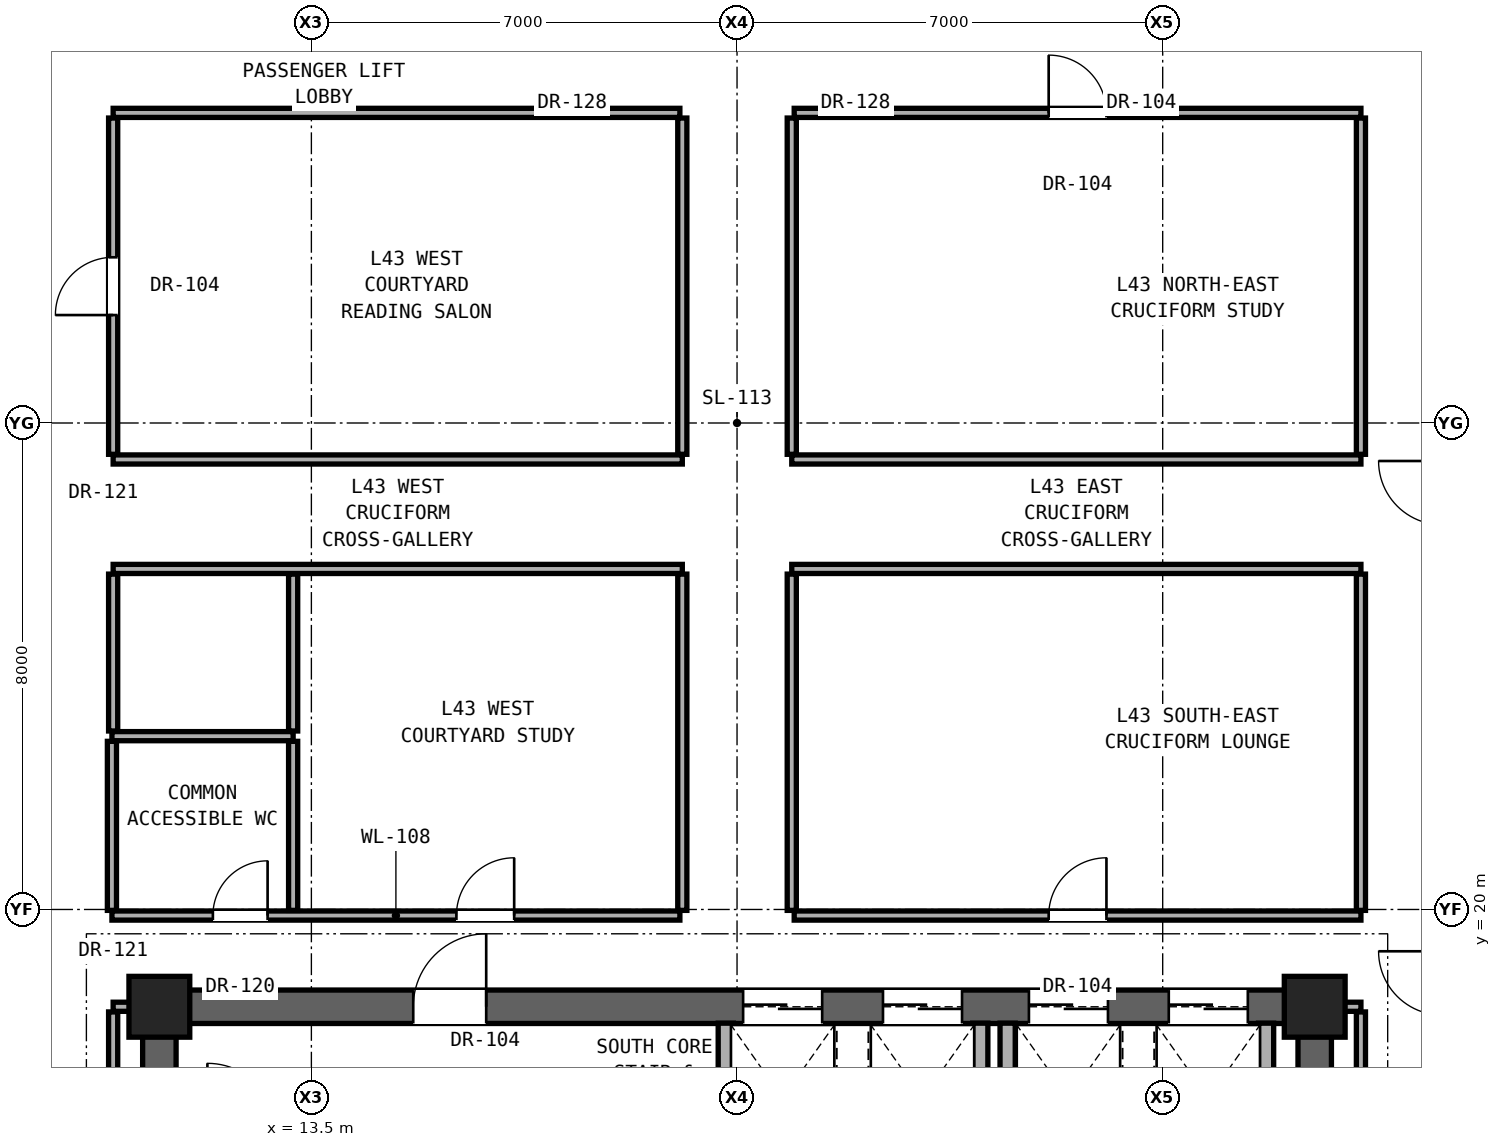
"""IFC4 building model, lengths in metres.
Left out: names, types, materials, properties, quantities, classifications, styles, units other than length and angle.
Written with IfcOpenShell. Run it as: python <this file> out.ifc"""

import sys

from ifc_helpers import new_model, si_unit, direction, frame, frame_2d, origin, origin_2d, place, context, subcontext, project, spatial, rectangle, extrude, element, fill, save


model = new_model("IFC4")
c1 = context("Model", 3, precision=1e-05, world=origin(), true_north=direction((0.0, 1.0)))
c2 = subcontext(c1, "Body", "Model", "MODEL_VIEW")
j1 = project(units=[si_unit("LENGTHUNIT", "METRE"), si_unit("PLANEANGLEUNIT", "RADIAN")], contexts=[c1])
p1 = place(None, origin())
s1 = spatial("IfcSite", under=j1, at=p1, CompositionType="ELEMENT")
p2 = place(p1, origin())
s2 = spatial("IfcBuilding", under=s1, at=p2, CompositionType="ELEMENT")
p3 = place(p2, frame((0.0, 0.0, 154.4)))
s3 = spatial("IfcBuildingStorey", under=s2, at=p3, CompositionType="ELEMENT", Elevation=154.4)
for number, where, z_axis, x_axis in (
    (1, (11.0, 18.4, 0.0), (0.0, 0.0, 1.0), (1.0, 0.0, 0.0)),
    (2, (30.0, 18.4, 0.0), (0.0, 0.0, 1.0), (1.0, 0.0, 0.0)),
):
    element("IfcColumn", number, at=place(p3, frame(where, z_axis=z_axis, x_axis=x_axis)), inside=s3, PredefinedType="COLUMN", context=c2, shape_type="SweptSolid", body=[
        extrude(rectangle(XDim=1.0, YDim=1.0, at=origin_2d()), origin(), (0.0, 0.0, 1.0), 3.25),
    ])
for number, where, z_axis, x_axis in (
    (3, (11.0, 12.4, 0.0), (0.0, 0.0, 1.0), (0.0, 1.0, 0.0)),
    (4, (30.0, 12.4, 0.0), (0.0, 0.0, 1.0), (0.0, 1.0, 0.0)),
):
    element("IfcWall", number, at=place(p3, frame(where, z_axis=z_axis, x_axis=x_axis)), inside=s3, PredefinedType="SHEAR", context=c2, shape_type="SweptSolid", body=[
        extrude(rectangle(XDim=6.0, YDim=0.55, at=frame_2d((3.0, 0.0))), origin(), (0.0, 0.0, 1.0), 3.05),
    ])
p4 = place(p3, frame((11.0, 18.4, 0.0), z_axis=(0.0, 0.0, 1.0), x_axis=(1.0, 0.0, 0.0)))
e5 = element("IfcWall", 5, at=p4, inside=s3, PredefinedType="SHEAR", context=c2, shape_type="SweptSolid", body=[
    extrude(rectangle(XDim=19.0, YDim=0.55, at=frame_2d((9.5, 0.0))), origin(), (0.0, 0.0, 1.0), 3.05),
])
p5 = place(p4, frame((4.175, 0.0, 0.0)))
e6 = element("IfcOpeningElement", 6, at=p5, cuts=e5, PredefinedType="OPENING", context=c2, shape_type="SweptSolid", body=[
    extrude(rectangle(XDim=1.2, YDim=2.25, at=frame_2d((0.6, 1.125))), frame((0.0, 0.285, 0.0), z_axis=(0.0, -1.0, 0.0), x_axis=(1.0, 0.0, 0.0)), (0.0, 0.0, 1.0), 0.57),
])
p6 = place(p4, frame((9.6, 0.0, 0.0)))
e7 = element("IfcOpeningElement", 7, at=p6, cuts=e5, PredefinedType="OPENING", context=c2, shape_type="SweptSolid", body=[
    extrude(rectangle(XDim=1.3, YDim=2.3, at=frame_2d((0.65, 1.15))), frame((0.0, 0.285, 0.0), z_axis=(0.0, -1.0, 0.0), x_axis=(1.0, 0.0, 0.0)), (0.0, 0.0, 1.0), 0.57),
])
p7 = place(p4, frame((11.9, 0.0, 0.0)))
e8 = element("IfcOpeningElement", 8, at=p7, cuts=e5, PredefinedType="OPENING", context=c2, shape_type="SweptSolid", body=[
    extrude(rectangle(XDim=1.3, YDim=2.3, at=frame_2d((0.65, 1.15))), frame((0.0, 0.285, 0.0), z_axis=(0.0, -1.0, 0.0), x_axis=(1.0, 0.0, 0.0)), (0.0, 0.0, 1.0), 0.57),
])
p8 = place(p4, frame((14.3, 0.0, 0.0)))
e9 = element("IfcOpeningElement", 9, at=p8, cuts=e5, PredefinedType="OPENING", context=c2, shape_type="SweptSolid", body=[
    extrude(rectangle(XDim=1.3, YDim=2.3, at=frame_2d((0.65, 1.15))), frame((0.0, 0.285, 0.0), z_axis=(0.0, -1.0, 0.0), x_axis=(1.0, 0.0, 0.0)), (0.0, 0.0, 1.0), 0.57),
])
p9 = place(p4, frame((16.6, 0.0, 0.0)))
e10 = element("IfcOpeningElement", 10, at=p9, cuts=e5, PredefinedType="OPENING", context=c2, shape_type="SweptSolid", body=[
    extrude(rectangle(XDim=1.3, YDim=2.3, at=frame_2d((0.65, 1.15))), frame((0.0, 0.285, 0.0), z_axis=(0.0, -1.0, 0.0), x_axis=(1.0, 0.0, 0.0)), (0.0, 0.0, 1.0), 0.57),
])
for number, where, z_axis, x_axis in (
    (11, (10.24, 18.4, 0.0), (0.0, 0.0, 1.0), (1.0, 0.0, 0.0)),
    (12, (30.27, 18.4, 0.0), (0.0, 0.0, 1.0), (1.0, 0.0, 0.0)),
):
    element("IfcWall", number, at=place(p3, frame(where, z_axis=z_axis, x_axis=x_axis)), inside=s3, PredefinedType="PARTITIONING", context=c2, shape_type="SweptSolid", body=[
        extrude(rectangle(XDim=0.49, YDim=0.15, at=frame_2d((0.245, 0.0))), origin(), (0.0, 0.0, 1.0), 2.442),
    ])
p10 = place(p3, frame((10.22, 19.9, 0.0), z_axis=(0.0, 0.0, 1.0), x_axis=(1.0, 0.0, 0.0)))
e13 = element("IfcWall", 13, at=p10, inside=s3, PredefinedType="PARTITIONING", context=c2, shape_type="SweptSolid", body=[
    extrude(rectangle(XDim=9.34, YDim=0.15, at=frame_2d((4.67, 0.0))), origin(), (0.0, 0.0, 1.0), 2.186),
])
p11 = place(p10, frame((1.66, 0.0, 0.0)))
e14 = element("IfcOpeningElement", 14, at=p11, cuts=e13, PredefinedType="OPENING", context=c2, shape_type="SweptSolid", body=[
    extrude(rectangle(XDim=0.9, YDim=2.1, at=frame_2d((0.45, 1.05))), frame((0.0, 0.085, 0.0), z_axis=(0.0, -1.0, 0.0), x_axis=(1.0, 0.0, 0.0)), (0.0, 0.0, 1.0), 0.17),
])
p12 = place(p10, frame((5.665, 0.0, 0.0)))
e15 = element("IfcOpeningElement", 15, at=p12, cuts=e13, PredefinedType="OPENING", context=c2, shape_type="SweptSolid", body=[
    extrude(rectangle(XDim=0.95, YDim=2.15, at=frame_2d((0.475, 1.075))), frame((0.0, 0.085, 0.0), z_axis=(0.0, -1.0, 0.0), x_axis=(1.0, 0.0, 0.0)), (0.0, 0.0, 1.0), 0.17),
])
p13 = place(p3, frame((21.44, 19.9, 0.0), z_axis=(0.0, 0.0, 1.0), x_axis=(1.0, 0.0, 0.0)))
e16 = element("IfcWall", 16, at=p13, inside=s3, PredefinedType="PARTITIONING", context=c2, shape_type="SweptSolid", body=[
    extrude(rectangle(XDim=9.32, YDim=0.15, at=frame_2d((4.66, 0.0))), origin(), (0.0, 0.0, 1.0), 2.186),
])
p14 = place(p13, frame((4.185, 0.0, 0.0)))
e17 = element("IfcOpeningElement", 17, at=p14, cuts=e16, PredefinedType="OPENING", context=c2, shape_type="SweptSolid", body=[
    extrude(rectangle(XDim=0.95, YDim=2.15, at=frame_2d((0.475, 1.075))), frame((0.0, 0.085, 0.0), z_axis=(0.0, -1.0, 0.0), x_axis=(1.0, 0.0, 0.0)), (0.0, 0.0, 1.0), 0.17),
])
p15 = place(p3, frame((10.22, 22.85, 0.0), z_axis=(0.0, 0.0, 1.0), x_axis=(1.0, 0.0, 0.0)))
e18 = element("IfcWall", 18, at=p15, inside=s3, PredefinedType="PARTITIONING", context=c2, shape_type="SweptSolid", body=[
    extrude(rectangle(XDim=2.98, YDim=0.15, at=frame_2d((1.49, 0.0))), origin(), (0.0, 0.0, 1.0), 2.186),
])
for number, where, z_axis, x_axis in (
    (19, (10.24, 25.6, 0.0), (0.0, 0.0, 1.0), (1.0, 0.0, 0.0)),
    (20, (21.4, 25.6, 0.0), (0.0, 0.0, 1.0), (1.0, 0.0, 0.0)),
    (21, (10.24, 27.4, 0.0), (0.0, 0.0, 1.0), (1.0, 0.0, 0.0)),
    (22, (21.4, 27.4, 0.0), (0.0, 0.0, 1.0), (1.0, 0.0, 0.0)),
):
    element("IfcWall", number, at=place(p3, frame(where, z_axis=z_axis, x_axis=x_axis)), inside=s3, PredefinedType="PARTITIONING", context=c2, shape_type="SweptSolid", body=[
        extrude(rectangle(XDim=9.36, YDim=0.15, at=frame_2d((4.68, 0.0))), origin(), (0.0, 0.0, 1.0), 2.186),
    ])
p16 = place(p3, frame((10.24, 33.1, 0.0), z_axis=(0.0, 0.0, 1.0), x_axis=(1.0, 0.0, 0.0)))
e23 = element("IfcWall", 23, at=p16, inside=s3, PredefinedType="PARTITIONING", context=c2, shape_type="SweptSolid", body=[
    extrude(rectangle(XDim=9.32, YDim=0.15, at=frame_2d((4.66, 0.0))), origin(), (0.0, 0.0, 1.0), 2.186),
])
p17 = place(p3, frame((21.44, 33.1, 0.0), z_axis=(0.0, 0.0, 1.0), x_axis=(1.0, 0.0, 0.0)))
e24 = element("IfcWall", 24, at=p17, inside=s3, PredefinedType="PARTITIONING", context=c2, shape_type="SweptSolid", body=[
    extrude(rectangle(XDim=9.32, YDim=0.15, at=frame_2d((4.66, 0.0))), origin(), (0.0, 0.0, 1.0), 2.186),
])
p18 = place(p17, frame((4.185, 0.0, 0.0)))
e25 = element("IfcOpeningElement", 25, at=p18, cuts=e24, PredefinedType="OPENING", context=c2, shape_type="SweptSolid", body=[
    extrude(rectangle(XDim=0.95, YDim=2.15, at=frame_2d((0.475, 1.075))), frame((0.0, 0.085, 0.0), z_axis=(0.0, -1.0, 0.0), x_axis=(1.0, 0.0, 0.0)), (0.0, 0.0, 1.0), 0.17),
])
p19 = place(p3, frame((10.22, 19.985, 0.0), z_axis=(0.0, 0.0, 1.0), x_axis=(0.0, 1.0, 0.0)))
e26 = element("IfcWall", 26, at=p19, inside=s3, PredefinedType="PARTITIONING", context=c2, shape_type="SweptSolid", body=[
    extrude(rectangle(XDim=2.78, YDim=0.15, at=frame_2d((1.39, 0.0))), origin(), (0.0, 0.0, 1.0), 3.05),
])
p20 = place(p3, frame((10.24, 12.335, 0.0), z_axis=(0.0, 0.0, 1.0), x_axis=(0.0, 1.0, 0.0)))
e27 = element("IfcWall", 27, at=p20, inside=s3, PredefinedType="PARTITIONING", context=c2, shape_type="SweptSolid", body=[
    extrude(rectangle(XDim=5.98, YDim=0.15, at=frame_2d((2.99, 0.0))), origin(), (0.0, 0.0, 1.0), 2.442),
])
p21 = place(p3, frame((10.24, 22.935, 0.0), z_axis=(0.0, 0.0, 1.0), x_axis=(0.0, 1.0, 0.0)))
e28 = element("IfcWall", 28, at=p21, inside=s3, PredefinedType="PARTITIONING", context=c2, shape_type="SweptSolid", body=[
    extrude(rectangle(XDim=2.58, YDim=0.15, at=frame_2d((1.29, 0.0))), origin(), (0.0, 0.0, 1.0), 2.346),
])
p22 = place(p3, frame((10.24, 27.485, 0.0), z_axis=(0.0, 0.0, 1.0), x_axis=(0.0, 1.0, 0.0)))
e29 = element("IfcWall", 29, at=p22, inside=s3, PredefinedType="PARTITIONING", context=c2, shape_type="SweptSolid", body=[
    extrude(rectangle(XDim=5.53, YDim=0.15, at=frame_2d((2.765, 0.0))), origin(), (0.0, 0.0, 1.0), 2.346),
])
p23 = place(p22, frame((2.29, 0.0, 0.0)))
e30 = element("IfcOpeningElement", 30, at=p23, cuts=e29, PredefinedType="OPENING", context=c2, shape_type="SweptSolid", body=[
    extrude(rectangle(XDim=0.95, YDim=2.15, at=frame_2d((0.475, 1.075))), frame((0.0, 0.085, 0.0), z_axis=(0.0, -1.0, 0.0), x_axis=(1.0, 0.0, 0.0)), (0.0, 0.0, 1.0), 0.17),
])
p24 = place(p3, frame((13.2, 19.985, 0.0), z_axis=(0.0, 0.0, 1.0), x_axis=(0.0, 1.0, 0.0)))
e31 = element("IfcWall", 31, at=p24, inside=s3, PredefinedType="PARTITIONING", context=c2, shape_type="SweptSolid", body=[
    extrude(rectangle(XDim=2.78, YDim=0.15, at=frame_2d((1.39, 0.0))), origin(), (0.0, 0.0, 1.0), 3.05),
])
p25 = place(p3, frame((13.2, 22.935, 0.0), z_axis=(0.0, 0.0, 1.0), x_axis=(0.0, 1.0, 0.0)))
e32 = element("IfcWall", 32, at=p25, inside=s3, PredefinedType="PARTITIONING", context=c2, shape_type="SweptSolid", body=[
    extrude(rectangle(XDim=2.58, YDim=0.15, at=frame_2d((1.29, 0.0))), origin(), (0.0, 0.0, 1.0), 2.186),
])
for number, where, z_axis, x_axis in (
    (33, (19.6, 19.985, 0.0), (0.0, 0.0, 1.0), (0.0, 1.0, 0.0)),
    (34, (19.6, 27.485, 0.0), (0.0, 0.0, 1.0), (0.0, 1.0, 0.0)),
):
    element("IfcWall", number, at=place(p3, frame(where, z_axis=z_axis, x_axis=x_axis)), inside=s3, PredefinedType="PARTITIONING", context=c2, shape_type="SweptSolid", body=[
        extrude(rectangle(XDim=5.53, YDim=0.15, at=frame_2d((2.765, 0.0))), origin(), (0.0, 0.0, 1.0), 2.186),
    ])
p26 = place(p3, frame((20.315, 16.555, 0.0), z_axis=(0.0, 0.0, 1.0), x_axis=(0.0, 1.0, 0.0)))
e35 = element("IfcWall", 35, at=p26, inside=s3, PredefinedType="SOLIDWALL", context=c2, shape_type="SweptSolid", body=[
    extrude(rectangle(XDim=1.575, YDim=0.25, at=frame_2d((0.788, 0.0))), origin(), (0.0, 0.0, 1.0), 3.05),
])
for number, where, z_axis, x_axis in (
    (36, (21.4, 19.985, 0.0), (0.0, 0.0, 1.0), (0.0, 1.0, 0.0)),
    (37, (21.4, 27.485, 0.0), (0.0, 0.0, 1.0), (0.0, 1.0, 0.0)),
):
    element("IfcWall", number, at=place(p3, frame(where, z_axis=z_axis, x_axis=x_axis)), inside=s3, PredefinedType="PARTITIONING", context=c2, shape_type="SweptSolid", body=[
        extrude(rectangle(XDim=5.53, YDim=0.15, at=frame_2d((2.765, 0.0))), origin(), (0.0, 0.0, 1.0), 2.186),
    ])
for number, where, z_axis, x_axis in (
    (38, (24.5, 15.785, 0.0), (0.0, 0.0, 1.0), (0.0, 1.0, 0.0)),
    (39, (24.95, 15.785, 0.0), (0.0, 0.0, 1.0), (0.0, 1.0, 0.0)),
    (40, (29.2, 15.785, 0.0), (0.0, 0.0, 1.0), (0.0, 1.0, 0.0)),
):
    element("IfcWall", number, at=place(p3, frame(where, z_axis=z_axis, x_axis=x_axis)), inside=s3, PredefinedType="SOLIDWALL", context=c2, shape_type="SweptSolid", body=[
        extrude(rectangle(XDim=2.345, YDim=0.25, at=frame_2d((1.172, 0.0))), origin(), (0.0, 0.0, 1.0), 3.05),
    ])
p27 = place(p3, frame((30.76, 12.335, 0.0), z_axis=(0.0, 0.0, 1.0), x_axis=(0.0, 1.0, 0.0)))
e41 = element("IfcWall", 41, at=p27, inside=s3, PredefinedType="PARTITIONING", context=c2, shape_type="SweptSolid", body=[
    extrude(rectangle(XDim=5.98, YDim=0.15, at=frame_2d((2.99, 0.0))), origin(), (0.0, 0.0, 1.0), 2.442),
])
for number, where, z_axis, x_axis in (
    (42, (30.76, 19.985, 0.0), (0.0, 0.0, 1.0), (0.0, 1.0, 0.0)),
    (43, (30.76, 27.485, 0.0), (0.0, 0.0, 1.0), (0.0, 1.0, 0.0)),
):
    element("IfcWall", number, at=place(p3, frame(where, z_axis=z_axis, x_axis=x_axis)), inside=s3, PredefinedType="PARTITIONING", context=c2, shape_type="SweptSolid", body=[
        extrude(rectangle(XDim=5.53, YDim=0.15, at=frame_2d((2.765, 0.0))), origin(), (0.0, 0.0, 1.0), 2.346),
    ])
p28 = place(p5, origin())
e44 = element("IfcDoor", 44, at=p28, inside=s3, OperationType="SINGLE_SWING_RIGHT", PredefinedType="DOOR", context=c2, shape_type="SweptSolid", body=[
    extrude(rectangle(XDim=1.2, YDim=2.25, at=frame_2d((0.6, 1.125))), frame((0.0, 0.025, 0.0), z_axis=(0.0, -1.0, 0.0), x_axis=(1.0, 0.0, 0.0)), (0.0, 0.0, 1.0), 0.05),
])
fill(e6, e44)
p29 = place(p11, origin())
e45 = element("IfcDoor", 45, at=p29, inside=s3, OperationType="SINGLE_SWING_RIGHT", PredefinedType="DOOR", context=c2, shape_type="SweptSolid", body=[
    extrude(rectangle(XDim=0.9, YDim=2.1, at=frame_2d((0.45, 1.05))), frame((0.0, 0.025, 0.0), z_axis=(0.0, -1.0, 0.0), x_axis=(1.0, 0.0, 0.0)), (0.0, 0.0, 1.0), 0.05),
])
fill(e14, e45)
p30 = place(p12, origin())
e46 = element("IfcDoor", 46, at=p30, inside=s3, OperationType="SINGLE_SWING_RIGHT", PredefinedType="DOOR", context=c2, shape_type="SweptSolid", body=[
    extrude(rectangle(XDim=0.95, YDim=2.15, at=frame_2d((0.475, 1.075))), frame((0.0, 0.025, 0.0), z_axis=(0.0, -1.0, 0.0), x_axis=(1.0, 0.0, 0.0)), (0.0, 0.0, 1.0), 0.05),
])
fill(e15, e46)
p31 = place(p23, origin())
e47 = element("IfcDoor", 47, at=p31, inside=s3, OperationType="SINGLE_SWING_LEFT", PredefinedType="DOOR", context=c2, shape_type="SweptSolid", body=[
    extrude(rectangle(XDim=0.95, YDim=2.15, at=frame_2d((0.475, 1.075))), frame((0.0, 0.025, 0.0), z_axis=(0.0, -1.0, 0.0), x_axis=(1.0, 0.0, 0.0)), (0.0, 0.0, 1.0), 0.05),
])
fill(e30, e47)
p32 = place(p14, origin())
e48 = element("IfcDoor", 48, at=p32, inside=s3, OperationType="SINGLE_SWING_RIGHT", PredefinedType="DOOR", context=c2, shape_type="SweptSolid", body=[
    extrude(rectangle(XDim=0.95, YDim=2.15, at=frame_2d((0.475, 1.075))), frame((0.0, 0.025, 0.0), z_axis=(0.0, -1.0, 0.0), x_axis=(1.0, 0.0, 0.0)), (0.0, 0.0, 1.0), 0.05),
])
fill(e17, e48)
p33 = place(p18, origin())
e49 = element("IfcDoor", 49, at=p33, inside=s3, OperationType="SINGLE_SWING_LEFT", PredefinedType="DOOR", context=c2, shape_type="SweptSolid", body=[
    extrude(rectangle(XDim=0.95, YDim=2.15, at=frame_2d((0.475, 1.075))), frame((0.0, 0.025, 0.0), z_axis=(0.0, -1.0, 0.0), x_axis=(1.0, 0.0, 0.0)), (0.0, 0.0, 1.0), 0.05),
])
fill(e25, e49)
p34 = place(p6, origin())
e50 = element("IfcDoor", 50, at=p34, inside=s3, OperationType="DOUBLE_DOOR_SLIDING", PredefinedType="DOOR", context=c2, shape_type="SweptSolid", body=[
    extrude(rectangle(XDim=1.3, YDim=2.3, at=frame_2d((0.65, 1.15))), frame((0.0, 0.025, 0.0), z_axis=(0.0, -1.0, 0.0), x_axis=(1.0, 0.0, 0.0)), (0.0, 0.0, 1.0), 0.05),
])
fill(e7, e50)
p35 = place(p7, origin())
e51 = element("IfcDoor", 51, at=p35, inside=s3, OperationType="DOUBLE_DOOR_SLIDING", PredefinedType="DOOR", context=c2, shape_type="SweptSolid", body=[
    extrude(rectangle(XDim=1.3, YDim=2.3, at=frame_2d((0.65, 1.15))), frame((0.0, 0.025, 0.0), z_axis=(0.0, -1.0, 0.0), x_axis=(1.0, 0.0, 0.0)), (0.0, 0.0, 1.0), 0.05),
])
fill(e8, e51)
p36 = place(p8, origin())
e52 = element("IfcDoor", 52, at=p36, inside=s3, OperationType="DOUBLE_DOOR_SLIDING", PredefinedType="DOOR", context=c2, shape_type="SweptSolid", body=[
    extrude(rectangle(XDim=1.3, YDim=2.3, at=frame_2d((0.65, 1.15))), frame((0.0, 0.025, 0.0), z_axis=(0.0, -1.0, 0.0), x_axis=(1.0, 0.0, 0.0)), (0.0, 0.0, 1.0), 0.05),
])
fill(e9, e52)
p37 = place(p9, origin())
e53 = element("IfcDoor", 53, at=p37, inside=s3, OperationType="DOUBLE_DOOR_SLIDING", PredefinedType="DOOR", context=c2, shape_type="SweptSolid", body=[
    extrude(rectangle(XDim=1.3, YDim=2.3, at=frame_2d((0.65, 1.15))), frame((0.0, 0.025, 0.0), z_axis=(0.0, -1.0, 0.0), x_axis=(1.0, 0.0, 0.0)), (0.0, 0.0, 1.0), 0.05),
])
fill(e10, e53)
save(model, sys.argv[1])
